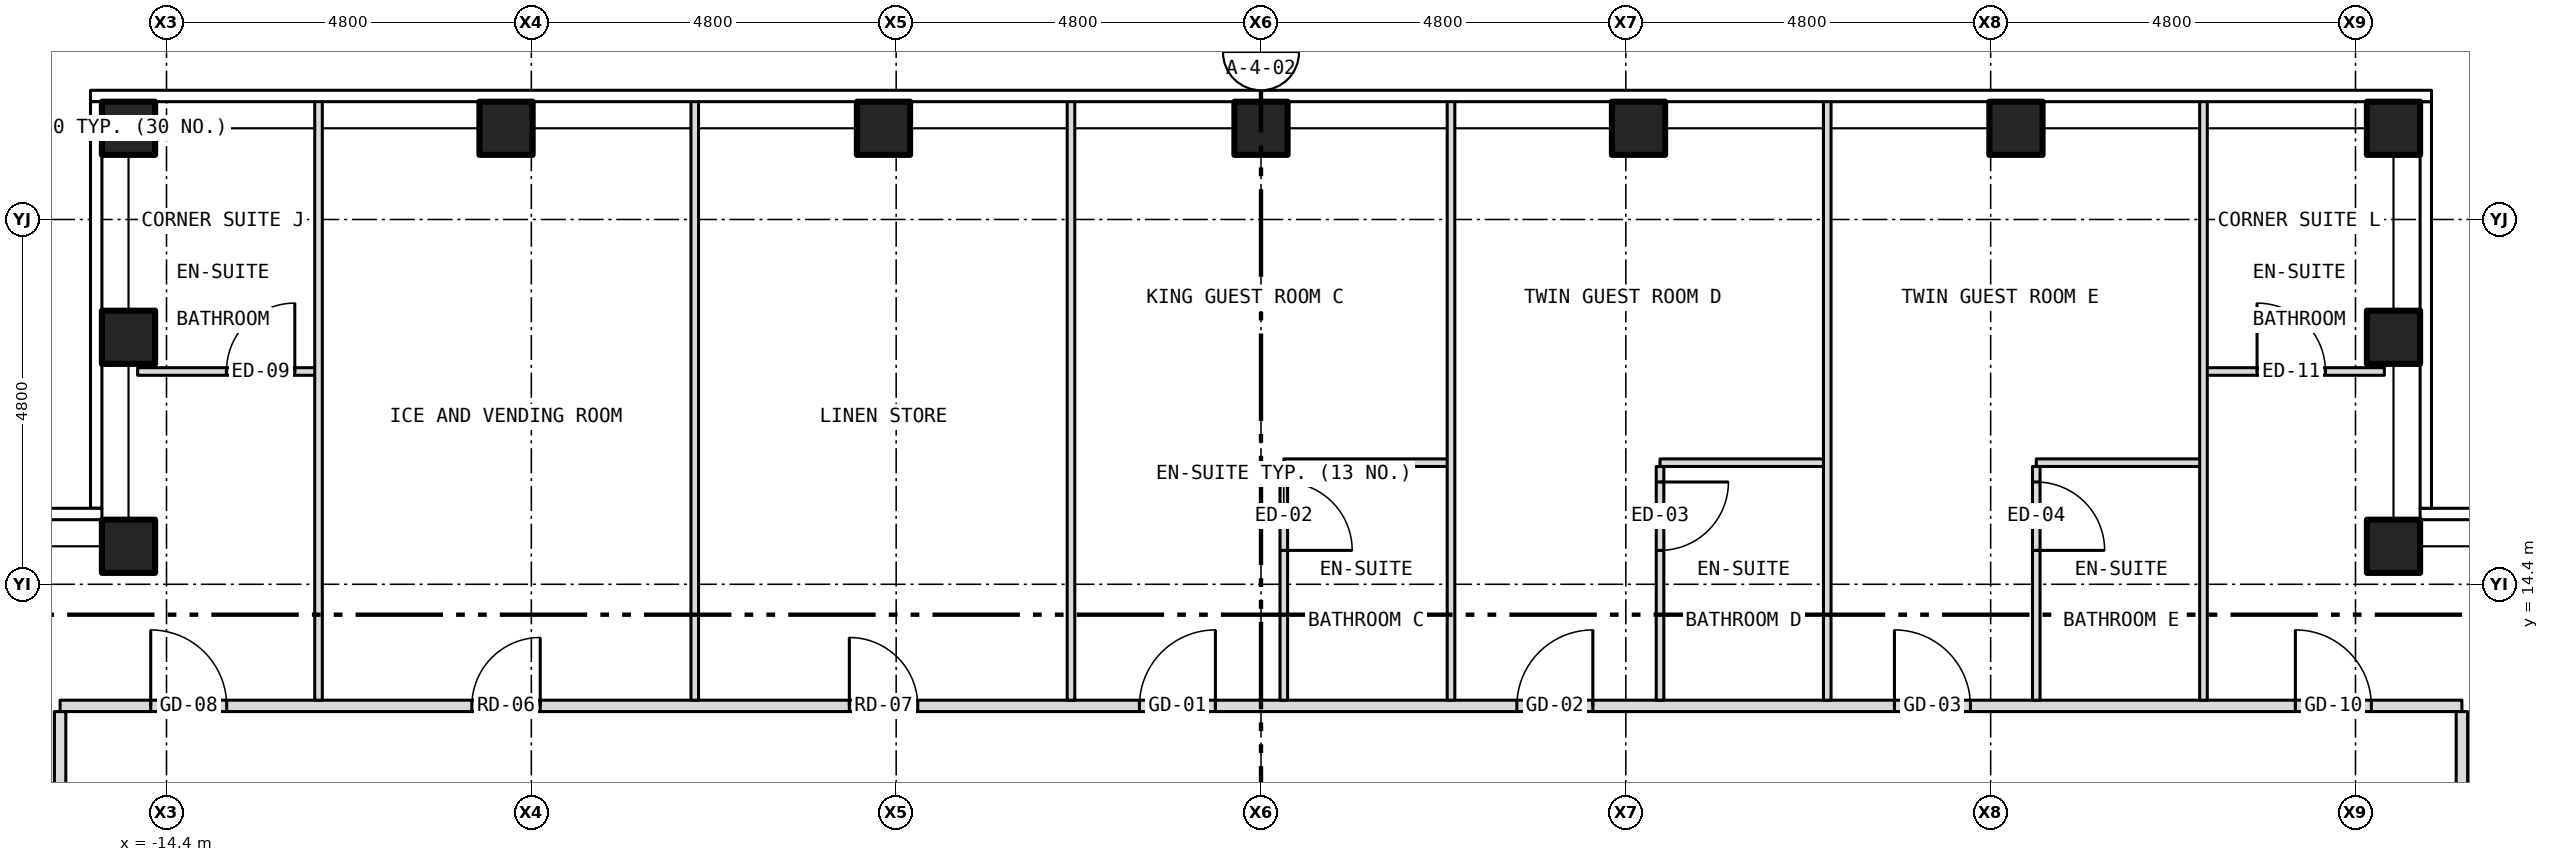
"""IFC4 building model, lengths in metres.
Left out: names, types, materials, properties, quantities, classifications, styles, units other than length and angle.
Written with IfcOpenShell. Run it as: python <this file> out.ifc"""

import sys

from ifc_helpers import new_model, si_unit, direction, frame, frame_2d, origin, origin_2d, place, context, subcontext, project, spatial, rectangle, hollow_rectangle, extrude, element, fill, save


model = new_model("IFC4")
c1 = context("Model", 3, precision=1e-05, world=origin(), true_north=direction((0.0, 1.0)))
c2 = subcontext(c1, "Body", "Model", "MODEL_VIEW")
j1 = project(units=[si_unit("LENGTHUNIT", "METRE"), si_unit("PLANEANGLEUNIT", "RADIAN")], contexts=[c1])
p1 = place(None, origin())
s1 = spatial("IfcSite", under=j1, at=p1, CompositionType="ELEMENT")
p2 = place(p1, origin())
s2 = spatial("IfcBuilding", under=s1, at=p2, CompositionType="ELEMENT")
p3 = place(p2, frame((0.0, 0.0, 212.0)))
s3 = spatial("IfcBuildingStorey", under=s2, at=p3, CompositionType="ELEMENT", Elevation=212.0)
for number, where, z_axis, x_axis in (
    (1, (-14.9, 20.4, -0.15), (0.0, 0.0, 1.0), (1.0, 0.0, 0.0)),
    (2, (-9.933, 20.4, -0.15), (0.0, 0.0, 1.0), (1.0, 0.0, 0.0)),
    (3, (-4.967, 20.4, -0.15), (0.0, 0.0, 1.0), (1.0, 0.0, 0.0)),
    (4, (0.0, 20.4, -0.15), (0.0, 0.0, 1.0), (1.0, 0.0, 0.0)),
    (5, (4.967, 20.4, -0.15), (0.0, 0.0, 1.0), (1.0, 0.0, 0.0)),
    (6, (9.933, 20.4, -0.15), (0.0, 0.0, 1.0), (1.0, 0.0, 0.0)),
    (7, (14.9, 20.4, -0.15), (0.0, 0.0, 1.0), (1.0, 0.0, 0.0)),
    (8, (-14.9, 14.9, -0.15), (0.0, 0.0, 1.0), (1.0, 0.0, 0.0)),
    (9, (-14.9, 17.65, -0.15), (0.0, 0.0, 1.0), (1.0, 0.0, 0.0)),
    (10, (14.9, 14.9, -0.15), (0.0, 0.0, 1.0), (1.0, 0.0, 0.0)),
    (11, (14.9, 17.65, -0.15), (0.0, 0.0, 1.0), (1.0, 0.0, 0.0)),
):
    element("IfcColumn", number, at=place(p3, frame(where, z_axis=z_axis, x_axis=x_axis)), inside=s3, PredefinedType="COLUMN", context=c2, shape_type="SweptSolid", body=[
        extrude(hollow_rectangle(XDim=0.7, YDim=0.7, WallThickness=0.04, at=origin_2d()), origin(), (0.0, 0.0, 1.0), 3.5),
    ])
p4 = place(p3, frame((-15.8, 12.8, 0.0), z_axis=(0.0, 0.0, 1.0), x_axis=(1.0, 0.0, 0.0)))
e12 = element("IfcWall", 12, at=p4, inside=s3, PredefinedType="PARTITIONING", context=c2, shape_type="SweptSolid", body=[
    extrude(rectangle(XDim=31.6, YDim=0.15, at=frame_2d((15.8, 0.0))), origin(), (0.0, 0.0, 1.0), 3.35),
])
p5 = place(p4, frame((5.417, 0.0, 0.0)))
e13 = element("IfcOpeningElement", 13, at=p5, cuts=e12, PredefinedType="OPENING", context=c2, shape_type="SweptSolid", body=[
    extrude(rectangle(XDim=0.9, YDim=2.1, at=frame_2d((0.45, 1.05))), frame((0.0, 0.087, 0.0), z_axis=(0.0, -1.0, 0.0), x_axis=(1.0, 0.0, 0.0)), (0.0, 0.0, 1.0), 0.174),
])
p6 = place(p4, frame((10.384, 0.0, 0.0)))
e14 = element("IfcOpeningElement", 14, at=p6, cuts=e12, PredefinedType="OPENING", context=c2, shape_type="SweptSolid", body=[
    extrude(rectangle(XDim=0.9, YDim=2.1, at=frame_2d((0.45, 1.05))), frame((0.0, 0.087, 0.0), z_axis=(0.0, -1.0, 0.0), x_axis=(1.0, 0.0, 0.0)), (0.0, 0.0, 1.0), 0.174),
])
p7 = place(p4, frame((14.2, 0.0, 0.0)))
e15 = element("IfcOpeningElement", 15, at=p7, cuts=e12, PredefinedType="OPENING", context=c2, shape_type="SweptSolid", body=[
    extrude(rectangle(XDim=1.0, YDim=2.1, at=frame_2d((0.5, 1.05))), frame((0.0, 0.087, 0.0), z_axis=(0.0, -1.0, 0.0), x_axis=(1.0, 0.0, 0.0)), (0.0, 0.0, 1.0), 0.174),
])
p8 = place(p4, frame((19.166, 0.0, 0.0)))
e16 = element("IfcOpeningElement", 16, at=p8, cuts=e12, PredefinedType="OPENING", context=c2, shape_type="SweptSolid", body=[
    extrude(rectangle(XDim=1.0, YDim=2.1, at=frame_2d((0.5, 1.05))), frame((0.0, 0.087, 0.0), z_axis=(0.0, -1.0, 0.0), x_axis=(1.0, 0.0, 0.0)), (0.0, 0.0, 1.0), 0.174),
])
p9 = place(p4, frame((24.134, 0.0, 0.0)))
e17 = element("IfcOpeningElement", 17, at=p9, cuts=e12, PredefinedType="OPENING", context=c2, shape_type="SweptSolid", body=[
    extrude(rectangle(XDim=1.0, YDim=2.1, at=frame_2d((0.5, 1.05))), frame((0.0, 0.087, 0.0), z_axis=(0.0, -1.0, 0.0), x_axis=(1.0, 0.0, 0.0)), (0.0, 0.0, 1.0), 0.174),
])
p10 = place(p4, frame((1.192, 0.0, 0.0)))
e18 = element("IfcOpeningElement", 18, at=p10, cuts=e12, PredefinedType="OPENING", context=c2, shape_type="SweptSolid", body=[
    extrude(rectangle(XDim=1.0, YDim=2.1, at=frame_2d((0.5, 1.05))), frame((0.0, 0.087, 0.0), z_axis=(0.0, -1.0, 0.0), x_axis=(1.0, 0.0, 0.0)), (0.0, 0.0, 1.0), 0.174),
])
p11 = place(p4, frame((29.409, 0.0, 0.0)))
e19 = element("IfcOpeningElement", 19, at=p11, cuts=e12, PredefinedType="OPENING", context=c2, shape_type="SweptSolid", body=[
    extrude(rectangle(XDim=1.0, YDim=2.1, at=frame_2d((0.5, 1.05))), frame((0.0, 0.087, 0.0), z_axis=(0.0, -1.0, 0.0), x_axis=(1.0, 0.0, 0.0)), (0.0, 0.0, 1.0), 0.174),
])
for number, where, z_axis, x_axis in (
    (20, (0.3, 16.0, 0.0), (0.0, 0.0, 1.0), (1.0, 0.0, 0.0)),
    (21, (5.25, 16.0, 0.0), (0.0, 0.0, 1.0), (1.0, 0.0, 0.0)),
    (22, (10.2, 16.0, 0.0), (0.0, 0.0, 1.0), (1.0, 0.0, 0.0)),
):
    element("IfcWall", number, at=place(p3, frame(where, z_axis=z_axis, x_axis=x_axis)), inside=s3, PredefinedType="PARTITIONING", context=c2, shape_type="SweptSolid", body=[
        extrude(rectangle(XDim=2.2, YDim=0.1, at=frame_2d((1.1, 0.0))), origin(), (0.0, 0.0, 1.0), 3.35),
    ])
p12 = place(p3, frame((-14.78, 17.2, 0.0), z_axis=(0.0, 0.0, 1.0), x_axis=(1.0, 0.0, 0.0)))
e23 = element("IfcWall", 23, at=p12, inside=s3, PredefinedType="PARTITIONING", context=c2, shape_type="SweptSolid", body=[
    extrude(rectangle(XDim=2.38, YDim=0.1, at=frame_2d((1.19, 0.0))), origin(), (0.0, 0.0, 1.0), 3.35),
])
p13 = place(p12, frame((1.168, 0.0, 0.0)))
e24 = element("IfcOpeningElement", 24, at=p13, cuts=e23, PredefinedType="OPENING", context=c2, shape_type="SweptSolid", body=[
    extrude(rectangle(XDim=0.9, YDim=2.1, at=frame_2d((0.45, 1.05))), frame((0.0, 0.062, 0.0), z_axis=(0.0, -1.0, 0.0), x_axis=(1.0, 0.0, 0.0)), (0.0, 0.0, 1.0), 0.124),
])
p14 = place(p3, frame((12.4, 17.2, 0.0), z_axis=(0.0, 0.0, 1.0), x_axis=(1.0, 0.0, 0.0)))
e25 = element("IfcWall", 25, at=p14, inside=s3, PredefinedType="PARTITIONING", context=c2, shape_type="SweptSolid", body=[
    extrude(rectangle(XDim=2.38, YDim=0.1, at=frame_2d((1.19, 0.0))), origin(), (0.0, 0.0, 1.0), 3.35),
])
p15 = place(p14, frame((0.705, 0.0, 0.0)))
e26 = element("IfcOpeningElement", 26, at=p15, cuts=e25, PredefinedType="OPENING", context=c2, shape_type="SweptSolid", body=[
    extrude(rectangle(XDim=0.9, YDim=2.1, at=frame_2d((0.45, 1.05))), frame((0.0, 0.062, 0.0), z_axis=(0.0, -1.0, 0.0), x_axis=(1.0, 0.0, 0.0)), (0.0, 0.0, 1.0), 0.124),
])
p16 = place(p3, frame((-15.8, 10.92, 0.0), z_axis=(0.0, 0.0, 1.0), x_axis=(0.0, 1.0, 0.0)))
e27 = element("IfcWall", 27, at=p16, inside=s3, PredefinedType="PARTITIONING", context=c2, shape_type="SweptSolid", body=[
    extrude(rectangle(XDim=1.805, YDim=0.15, at=frame_2d((0.903, 0.0))), origin(), (0.0, 0.0, 1.0), 3.35),
])
for number, where, z_axis, x_axis in (
    (28, (-12.4, 12.875, 0.0), (0.0, 0.0, 1.0), (0.0, 1.0, 0.0)),
    (29, (-7.45, 12.875, 0.0), (0.0, 0.0, 1.0), (0.0, 1.0, 0.0)),
    (30, (-2.5, 12.875, 0.0), (0.0, 0.0, 1.0), (0.0, 1.0, 0.0)),
):
    element("IfcWall", number, at=place(p3, frame(where, z_axis=z_axis, x_axis=x_axis)), inside=s3, PredefinedType="PARTITIONING", context=c2, shape_type="SweptSolid", body=[
        extrude(rectangle(XDim=7.905, YDim=0.1, at=frame_2d((3.953, 0.0))), origin(), (0.0, 0.0, 1.0), 3.35),
    ])
p17 = place(p3, frame((0.3, 12.875, 0.0), z_axis=(0.0, 0.0, 1.0), x_axis=(0.0, 1.0, 0.0)))
e31 = element("IfcWall", 31, at=p17, inside=s3, PredefinedType="PARTITIONING", context=c2, shape_type="SweptSolid", body=[
    extrude(rectangle(XDim=3.075, YDim=0.1, at=frame_2d((1.538, 0.0))), origin(), (0.0, 0.0, 1.0), 3.35),
])
p18 = place(p17, frame((1.971, 0.0, 0.0)))
e32 = element("IfcOpeningElement", 32, at=p18, cuts=e31, PredefinedType="OPENING", context=c2, shape_type="SweptSolid", body=[
    extrude(rectangle(XDim=0.9, YDim=2.1, at=frame_2d((0.45, 1.05))), frame((0.0, 0.062, 0.0), z_axis=(0.0, -1.0, 0.0), x_axis=(1.0, 0.0, 0.0)), (0.0, 0.0, 1.0), 0.124),
])
p19 = place(p3, frame((2.5, 12.875, 0.0), z_axis=(0.0, 0.0, 1.0), x_axis=(0.0, 1.0, 0.0)))
e33 = element("IfcWall", 33, at=p19, inside=s3, PredefinedType="PARTITIONING", context=c2, shape_type="SweptSolid", body=[
    extrude(rectangle(XDim=7.905, YDim=0.1, at=frame_2d((3.953, 0.0))), origin(), (0.0, 0.0, 1.0), 3.35),
])
p20 = place(p3, frame((5.25, 12.875, 0.0), z_axis=(0.0, 0.0, 1.0), x_axis=(0.0, 1.0, 0.0)))
e34 = element("IfcWall", 34, at=p20, inside=s3, PredefinedType="PARTITIONING", context=c2, shape_type="SweptSolid", body=[
    extrude(rectangle(XDim=3.075, YDim=0.1, at=frame_2d((1.538, 0.0))), origin(), (0.0, 0.0, 1.0), 3.35),
])
p21 = place(p20, frame((1.971, 0.0, 0.0)))
e35 = element("IfcOpeningElement", 35, at=p21, cuts=e34, PredefinedType="OPENING", context=c2, shape_type="SweptSolid", body=[
    extrude(rectangle(XDim=0.9, YDim=2.1, at=frame_2d((0.45, 1.05))), frame((0.0, 0.062, 0.0), z_axis=(0.0, -1.0, 0.0), x_axis=(1.0, 0.0, 0.0)), (0.0, 0.0, 1.0), 0.124),
])
p22 = place(p3, frame((7.45, 12.875, 0.0), z_axis=(0.0, 0.0, 1.0), x_axis=(0.0, 1.0, 0.0)))
e36 = element("IfcWall", 36, at=p22, inside=s3, PredefinedType="PARTITIONING", context=c2, shape_type="SweptSolid", body=[
    extrude(rectangle(XDim=7.905, YDim=0.1, at=frame_2d((3.953, 0.0))), origin(), (0.0, 0.0, 1.0), 3.35),
])
p23 = place(p3, frame((10.2, 12.875, 0.0), z_axis=(0.0, 0.0, 1.0), x_axis=(0.0, 1.0, 0.0)))
e37 = element("IfcWall", 37, at=p23, inside=s3, PredefinedType="PARTITIONING", context=c2, shape_type="SweptSolid", body=[
    extrude(rectangle(XDim=3.075, YDim=0.1, at=frame_2d((1.538, 0.0))), origin(), (0.0, 0.0, 1.0), 3.35),
])
p24 = place(p23, frame((1.971, 0.0, 0.0)))
e38 = element("IfcOpeningElement", 38, at=p24, cuts=e37, PredefinedType="OPENING", context=c2, shape_type="SweptSolid", body=[
    extrude(rectangle(XDim=0.9, YDim=2.1, at=frame_2d((0.45, 1.05))), frame((0.0, 0.062, 0.0), z_axis=(0.0, -1.0, 0.0), x_axis=(1.0, 0.0, 0.0)), (0.0, 0.0, 1.0), 0.124),
])
p25 = place(p3, frame((12.4, 12.875, 0.0), z_axis=(0.0, 0.0, 1.0), x_axis=(0.0, 1.0, 0.0)))
e39 = element("IfcWall", 39, at=p25, inside=s3, PredefinedType="PARTITIONING", context=c2, shape_type="SweptSolid", body=[
    extrude(rectangle(XDim=7.905, YDim=0.1, at=frame_2d((3.953, 0.0))), origin(), (0.0, 0.0, 1.0), 3.35),
])
p26 = place(p3, frame((15.8, 10.92, 0.0), z_axis=(0.0, 0.0, 1.0), x_axis=(0.0, 1.0, 0.0)))
e40 = element("IfcWall", 40, at=p26, inside=s3, PredefinedType="PARTITIONING", context=c2, shape_type="SweptSolid", body=[
    extrude(rectangle(XDim=1.805, YDim=0.15, at=frame_2d((0.903, 0.0))), origin(), (0.0, 0.0, 1.0), 3.35),
])
p27 = place(p5, origin())
e41 = element("IfcDoor", 41, at=p27, inside=s3, OperationType="SINGLE_SWING_RIGHT", PredefinedType="DOOR", context=c2, shape_type="SweptSolid", body=[
    extrude(rectangle(XDim=0.9, YDim=2.1, at=frame_2d((0.45, 1.05))), frame((0.0, 0.025, 0.0), z_axis=(0.0, -1.0, 0.0), x_axis=(1.0, 0.0, 0.0)), (0.0, 0.0, 1.0), 0.05),
])
fill(e13, e41)
p28 = place(p6, origin())
e42 = element("IfcDoor", 42, at=p28, inside=s3, OperationType="SINGLE_SWING_LEFT", PredefinedType="DOOR", context=c2, shape_type="SweptSolid", body=[
    extrude(rectangle(XDim=0.9, YDim=2.1, at=frame_2d((0.45, 1.05))), frame((0.0, 0.025, 0.0), z_axis=(0.0, -1.0, 0.0), x_axis=(1.0, 0.0, 0.0)), (0.0, 0.0, 1.0), 0.05),
])
fill(e14, e42)
p29 = place(p7, origin())
e43 = element("IfcDoor", 43, at=p29, inside=s3, OperationType="SINGLE_SWING_RIGHT", PredefinedType="DOOR", context=c2, shape_type="SweptSolid", body=[
    extrude(rectangle(XDim=1.0, YDim=2.1, at=frame_2d((0.5, 1.05))), frame((0.0, 0.025, 0.0), z_axis=(0.0, -1.0, 0.0), x_axis=(1.0, 0.0, 0.0)), (0.0, 0.0, 1.0), 0.05),
])
fill(e15, e43)
p30 = place(p18, origin())
e44 = element("IfcDoor", 44, at=p30, inside=s3, OperationType="SINGLE_SWING_LEFT", PredefinedType="DOOR", context=c2, shape_type="SweptSolid", body=[
    extrude(rectangle(XDim=0.9, YDim=2.1, at=frame_2d((0.45, 1.05))), frame((0.0, 0.025, 0.0), z_axis=(0.0, -1.0, 0.0), x_axis=(1.0, 0.0, 0.0)), (0.0, 0.0, 1.0), 0.05),
])
fill(e32, e44)
p31 = place(p8, origin())
e45 = element("IfcDoor", 45, at=p31, inside=s3, OperationType="SINGLE_SWING_RIGHT", PredefinedType="DOOR", context=c2, shape_type="SweptSolid", body=[
    extrude(rectangle(XDim=1.0, YDim=2.1, at=frame_2d((0.5, 1.05))), frame((0.0, 0.025, 0.0), z_axis=(0.0, -1.0, 0.0), x_axis=(1.0, 0.0, 0.0)), (0.0, 0.0, 1.0), 0.05),
])
fill(e16, e45)
p32 = place(p21, origin())
e46 = element("IfcDoor", 46, at=p32, inside=s3, OperationType="SINGLE_SWING_RIGHT", PredefinedType="DOOR", context=c2, shape_type="SweptSolid", body=[
    extrude(rectangle(XDim=0.9, YDim=2.1, at=frame_2d((0.45, 1.05))), frame((0.0, 0.025, 0.0), z_axis=(0.0, -1.0, 0.0), x_axis=(1.0, 0.0, 0.0)), (0.0, 0.0, 1.0), 0.05),
])
fill(e35, e46)
p33 = place(p9, origin())
e47 = element("IfcDoor", 47, at=p33, inside=s3, OperationType="SINGLE_SWING_LEFT", PredefinedType="DOOR", context=c2, shape_type="SweptSolid", body=[
    extrude(rectangle(XDim=1.0, YDim=2.1, at=frame_2d((0.5, 1.05))), frame((0.0, 0.025, 0.0), z_axis=(0.0, -1.0, 0.0), x_axis=(1.0, 0.0, 0.0)), (0.0, 0.0, 1.0), 0.05),
])
fill(e17, e47)
p34 = place(p24, origin())
e48 = element("IfcDoor", 48, at=p34, inside=s3, OperationType="SINGLE_SWING_LEFT", PredefinedType="DOOR", context=c2, shape_type="SweptSolid", body=[
    extrude(rectangle(XDim=0.9, YDim=2.1, at=frame_2d((0.45, 1.05))), frame((0.0, 0.025, 0.0), z_axis=(0.0, -1.0, 0.0), x_axis=(1.0, 0.0, 0.0)), (0.0, 0.0, 1.0), 0.05),
])
fill(e38, e48)
p35 = place(p13, origin())
e49 = element("IfcDoor", 49, at=p35, inside=s3, OperationType="SINGLE_SWING_RIGHT", PredefinedType="DOOR", context=c2, shape_type="SweptSolid", body=[
    extrude(rectangle(XDim=0.9, YDim=2.1, at=frame_2d((0.45, 1.05))), frame((0.0, 0.025, 0.0), z_axis=(0.0, -1.0, 0.0), x_axis=(1.0, 0.0, 0.0)), (0.0, 0.0, 1.0), 0.05),
])
fill(e24, e49)
p36 = place(p10, origin())
e50 = element("IfcDoor", 50, at=p36, inside=s3, OperationType="SINGLE_SWING_LEFT", PredefinedType="DOOR", context=c2, shape_type="SweptSolid", body=[
    extrude(rectangle(XDim=1.0, YDim=2.1, at=frame_2d((0.5, 1.05))), frame((0.0, 0.025, 0.0), z_axis=(0.0, -1.0, 0.0), x_axis=(1.0, 0.0, 0.0)), (0.0, 0.0, 1.0), 0.05),
])
fill(e18, e50)
p37 = place(p15, origin())
e51 = element("IfcDoor", 51, at=p37, inside=s3, OperationType="SINGLE_SWING_LEFT", PredefinedType="DOOR", context=c2, shape_type="SweptSolid", body=[
    extrude(rectangle(XDim=0.9, YDim=2.1, at=frame_2d((0.45, 1.05))), frame((0.0, 0.025, 0.0), z_axis=(0.0, -1.0, 0.0), x_axis=(1.0, 0.0, 0.0)), (0.0, 0.0, 1.0), 0.05),
])
fill(e26, e51)
p38 = place(p11, origin())
e52 = element("IfcDoor", 52, at=p38, inside=s3, OperationType="SINGLE_SWING_LEFT", PredefinedType="DOOR", context=c2, shape_type="SweptSolid", body=[
    extrude(rectangle(XDim=1.0, YDim=2.1, at=frame_2d((0.5, 1.05))), frame((0.0, 0.025, 0.0), z_axis=(0.0, -1.0, 0.0), x_axis=(1.0, 0.0, 0.0)), (0.0, 0.0, 1.0), 0.05),
])
fill(e19, e52)
save(model, sys.argv[1])
